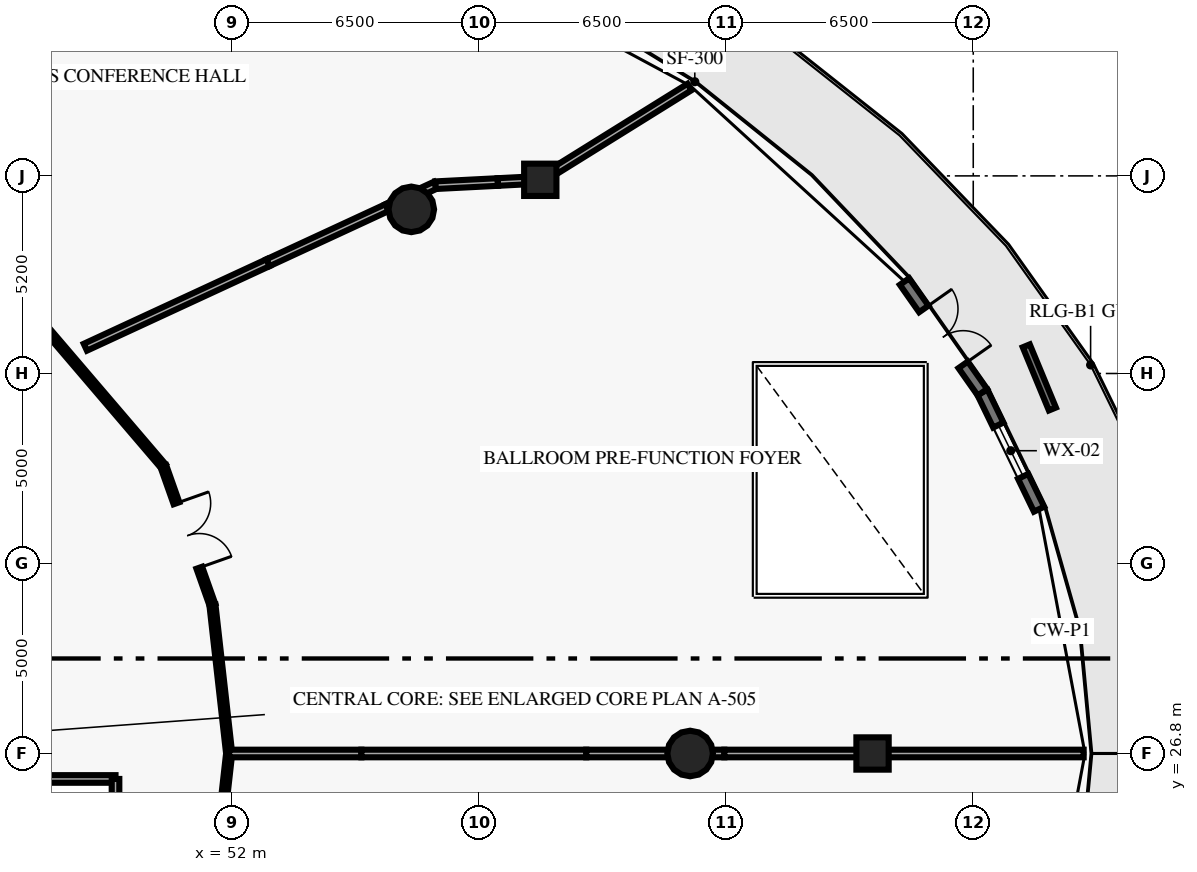
"""IFC4 building model, lengths in metres.
Left out: names, types, materials, properties, quantities, classifications, styles, units other than length and angle.
Written with IfcOpenShell. Run it as: python <this file> out.ifc"""

import sys

from ifc_helpers import new_model, si_unit, direction, frame, frame_2d, origin, origin_2d, place, context, subcontext, project, spatial, rectangle, circle, extrude, element, fill, save


model = new_model("IFC4")
c1 = context("Model", 3, precision=1e-05, world=origin(), true_north=direction((0.0, 1.0)))
c2 = subcontext(c1, "Body", "Model", "MODEL_VIEW")
j1 = project(units=[si_unit("LENGTHUNIT", "METRE"), si_unit("PLANEANGLEUNIT", "RADIAN")], contexts=[c1])
p1 = place(None, origin())
s1 = spatial("IfcSite", under=j1, at=p1, CompositionType="ELEMENT")
p2 = place(p1, origin())
s2 = spatial("IfcBuilding", under=s1, at=p2, CompositionType="ELEMENT")
p3 = place(p2, frame((0.0, 0.0, 11.0)))
s3 = spatial("IfcBuildingStorey", under=s2, at=p3, CompositionType="ELEMENT", Elevation=11.0)
for number, where, z_axis, x_axis in (
    (1, (64.05, 26.8, 0.0), (0.0, 0.0, 1.0), (1.0, 0.0, 0.0)),
    (2, (56.713, 41.119, 0.0), (0.0, 0.0, 1.0), (1.0, 0.0, 0.0)),
):
    element("IfcColumn", number, at=place(p3, frame(where, z_axis=z_axis, x_axis=x_axis)), inside=s3, PredefinedType="COLUMN", context=c2, shape_type="SweptSolid", body=[
        extrude(circle(Radius=0.6, at=origin_2d()), origin(), (0.0, 0.0, 1.0), 4.7),
    ])
for number, where, z_axis, x_axis in (
    (3, (68.85, 26.8, 0.0), (0.0, 0.0, 1.0), (1.0, 0.0, 0.0)),
    (4, (60.107, 41.897, 0.0), (0.0, 0.0, 1.0), (1.0, 0.0, 0.0)),
):
    element("IfcColumn", number, at=place(p3, frame(where, z_axis=z_axis, x_axis=x_axis)), inside=s3, PredefinedType="COLUMN", context=c2, shape_type="SweptSolid", body=[
        extrude(rectangle(XDim=0.85, YDim=0.85, at=origin_2d()), origin(), (0.0, 0.0, 1.0), 4.7),
    ])
p4 = place(p3, frame((71.742, 36.306, 0.0), z_axis=(0.0, 0.0, 1.0), x_axis=(0.435837168614, -0.900025534335, 0.0)))
e5 = element("IfcWall", 5, at=p4, inside=s3, PredefinedType="STANDARD", context=c2, shape_type="SweptSolid", body=[
    extrude(rectangle(XDim=3.419, YDim=0.3, at=frame_2d((1.709, 0.0))), origin(), (0.0, 0.0, 1.0), 4.7),
])
p5 = place(p4, frame((0.959, 0.0, 0.9)))
e6 = element("IfcOpeningElement", 6, at=p5, cuts=e5, PredefinedType="OPENING", context=c2, shape_type="SweptSolid", body=[
    extrude(rectangle(XDim=1.5, YDim=2.2, at=frame_2d((0.75, 1.1))), frame((0.0, 0.16, 0.0), z_axis=(0.0, -1.0, 0.0), x_axis=(1.0, 0.0, 0.0)), (0.0, 0.0, 1.0), 0.32),
])
p6 = place(p3, frame((69.692, 39.22, 0.0), z_axis=(0.0, 0.0, 1.0), x_axis=(0.575383073495, -0.817884049689, 0.0)))
e7 = element("IfcWall", 7, at=p6, inside=s3, PredefinedType="STANDARD", context=c2, shape_type="SweptSolid", body=[
    extrude(rectangle(XDim=3.563, YDim=0.3, at=frame_2d((1.781, 0.0))), origin(), (0.0, 0.0, 1.0), 4.7),
])
p7 = place(p6, frame((0.881, 0.0, 0.0)))
e8 = element("IfcOpeningElement", 8, at=p7, cuts=e7, PredefinedType="OPENING", context=c2, shape_type="SweptSolid", body=[
    extrude(rectangle(XDim=1.8, YDim=2.25, at=frame_2d((0.9, 1.125))), frame((0.0, 0.16, 0.0), z_axis=(0.0, -1.0, 0.0), x_axis=(1.0, 0.0, 0.0)), (0.0, 0.0, 1.0), 0.32),
])
p8 = place(p3, frame((72.895, 37.528, 0.0), z_axis=(0.0, 0.0, 1.0), x_axis=(0.382263927846, -0.924053185411, 0.0)))
e9 = element("IfcWall", 9, at=p8, inside=s3, PredefinedType="ELEMENTEDWALL", context=c2, shape_type="SweptSolid", body=[
    extrude(rectangle(XDim=1.8, YDim=0.2, at=frame_2d((0.9, 0.0))), origin(), (0.0, 0.0, 1.0), 0.65),
])
p9 = place(p3, frame((46.62, 26.13, 0.0), z_axis=(0.0, 0.0, 1.0), x_axis=(1.0, 0.0, 0.0)))
e10 = element("IfcWall", 10, at=p9, inside=s3, PredefinedType="SOLIDWALL", context=c2, shape_type="SweptSolid", body=[
    extrude(rectangle(XDim=2.31, YDim=0.2, at=frame_2d((1.155, 0.0))), origin(), (0.0, 0.0, 1.0), 4.7),
])
p10 = place(p3, frame((48.93, 23.72, 0.0), z_axis=(0.0, 0.0, 1.0), x_axis=(0.0, 1.0, 0.0)))
e11 = element("IfcWall", 11, at=p10, inside=s3, PredefinedType="SOLIDWALL", context=c2, shape_type="SweptSolid", body=[
    extrude(rectangle(XDim=2.41, YDim=0.2, at=frame_2d((1.205, 0.0))), origin(), (0.0, 0.0, 1.0), 4.7),
])
p11 = place(p3, frame((51.92, 26.8, 0.0), z_axis=(0.0, 0.0, 1.0), x_axis=(-0.111731247657, 0.993738460711, 0.0)))
e12 = element("IfcWall", 12, at=p11, inside=s3, PredefinedType="PARTITIONING", context=c2, shape_type="SweptSolid", body=[
    extrude(rectangle(XDim=3.938, YDim=0.16, at=frame_2d((1.969, 0.0))), origin(), (0.0, 0.0, 1.0), 4.7),
])
p12 = place(p3, frame((50.189, 34.36, 0.0), z_axis=(0.0, 0.0, 1.0), x_axis=(0.333684770033, -0.942684716248, 0.0)))
e13 = element("IfcWall", 13, at=p12, inside=s3, PredefinedType="PARTITIONING", context=c2, shape_type="SweptSolid", body=[
    extrude(rectangle(XDim=3.869, YDim=0.16, at=frame_2d((1.935, 0.0))), origin(), (0.0, 0.0, 1.0), 4.7),
])
p13 = place(p12, frame((1.034, 0.0, 0.0)))
e14 = element("IfcOpeningElement", 14, at=p13, cuts=e13, PredefinedType="OPENING", context=c2, shape_type="SweptSolid", body=[
    extrude(rectangle(XDim=1.8, YDim=2.3, at=frame_2d((0.9, 1.15))), frame((0.0, 0.09, 0.0), z_axis=(0.0, -1.0, 0.0), x_axis=(1.0, 0.0, 0.0)), (0.0, 0.0, 1.0), 0.18),
])
p14 = place(p3, frame((50.189, 34.36, 0.0), z_axis=(0.0, 0.0, 1.0), x_axis=(-0.649652680018, 0.760231145998, 0.0)))
e15 = element("IfcWall", 15, at=p14, inside=s3, PredefinedType="PARTITIONING", context=c2, shape_type="SweptSolid", body=[
    extrude(rectangle(XDim=7.279, YDim=0.16, at=frame_2d((3.64, 0.0))), origin(), (0.0, 0.0, 1.0), 4.7),
])
p15 = place(p3, frame((51.92, 26.8, 0.0), z_axis=(0.0, 0.0, 1.0), x_axis=(-0.111724363671, -0.99373923469, 0.0)))
e16 = element("IfcWall", 16, at=p15, inside=s3, PredefinedType="PARTITIONING", context=c2, shape_type="SweptSolid", body=[
    extrude(rectangle(XDim=3.938, YDim=0.16, at=frame_2d((1.969, 0.0))), origin(), (0.0, 0.0, 1.0), 4.7),
])
p16 = place(p15, frame((1.069, 0.0, 0.0)))
e17 = element("IfcOpeningElement", 17, at=p16, cuts=e16, PredefinedType="OPENING", context=c2, shape_type="SweptSolid", body=[
    extrude(rectangle(XDim=1.8, YDim=2.3, at=frame_2d((0.9, 1.15))), frame((0.0, 0.09, 0.0), z_axis=(0.0, -1.0, 0.0), x_axis=(1.0, 0.0, 0.0)), (0.0, 0.0, 1.0), 0.18),
])
p17 = place(p3, frame((51.92, 26.8, 0.0), z_axis=(0.0, 0.0, 1.0), x_axis=(1.0, 0.0, 0.0)))
e18 = element("IfcWall", 18, at=p17, inside=s3, PredefinedType="PARTITIONING", context=c2, shape_type="SweptSolid", body=[
    extrude(rectangle(XDim=3.48, YDim=0.2, at=frame_2d((1.74, 0.0))), origin(), (0.0, 0.0, 1.0), 4.7),
])
p18 = place(p3, frame((55.4, 26.8, 0.0), z_axis=(0.0, 0.0, 1.0), x_axis=(1.0, 0.0, 0.0)))
e19 = element("IfcWall", 19, at=p18, inside=s3, PredefinedType="PARTITIONING", context=c2, shape_type="SweptSolid", body=[
    extrude(rectangle(XDim=5.917, YDim=0.2, at=frame_2d((2.958, 0.0))), origin(), (0.0, 0.0, 1.0), 4.7),
])
p19 = place(p3, frame((61.317, 26.8, 0.0), z_axis=(0.0, 0.0, 1.0), x_axis=(1.0, 0.0, 0.0)))
e20 = element("IfcWall", 20, at=p19, inside=s3, PredefinedType="PARTITIONING", context=c2, shape_type="SweptSolid", body=[
    extrude(rectangle(XDim=3.633, YDim=0.2, at=frame_2d((1.816, 0.0))), origin(), (0.0, 0.0, 1.0), 3.66),
])
p20 = place(p3, frame((64.95, 26.8, 0.0), z_axis=(0.0, 0.0, 1.0), x_axis=(1.0, 0.0, 0.0)))
e21 = element("IfcWall", 21, at=p20, inside=s3, PredefinedType="PARTITIONING", context=c2, shape_type="SweptSolid", body=[
    extrude(rectangle(XDim=3.9, YDim=0.2, at=frame_2d((1.95, 0.0))), origin(), (0.0, 0.0, 1.0), 4.24),
])
p21 = place(p3, frame((68.85, 26.8, 0.0), z_axis=(0.0, 0.0, 1.0), x_axis=(1.0, 0.0, 0.0)))
e22 = element("IfcWall", 22, at=p21, inside=s3, PredefinedType="PARTITIONING", context=c2, shape_type="SweptSolid", body=[
    extrude(rectangle(XDim=5.555, YDim=0.2, at=frame_2d((2.777, 0.0))), origin(), (0.0, 0.0, 1.0), 4.7),
])
p22 = place(p3, frame((48.136, 37.491, 0.0), z_axis=(0.0, 0.0, 1.0), x_axis=(0.907524785669, 0.419998527851, 0.0)))
e23 = element("IfcWall", 23, at=p22, inside=s3, PredefinedType="PARTITIONING", context=c2, shape_type="SweptSolid", body=[
    extrude(rectangle(XDim=5.3, YDim=0.2, at=frame_2d((2.65, 0.0))), origin(), (0.0, 0.0, 1.0), 4.7),
])
p23 = place(p3, frame((52.946, 39.717, 0.0), z_axis=(0.0, 0.0, 1.0), x_axis=(0.90747190463, 0.420112773321, 0.0)))
e24 = element("IfcWall", 24, at=p23, inside=s3, PredefinedType="PARTITIONING", context=c2, shape_type="SweptSolid", body=[
    extrude(rectangle(XDim=3.449, YDim=0.2, at=frame_2d((1.725, 0.0))), origin(), (0.0, 0.0, 1.0), 3.92),
])
p24 = place(p3, frame((56.076, 41.166, 0.0), z_axis=(0.0, 0.0, 1.0), x_axis=(0.907622896373, 0.419786467124, 0.0)))
e25 = element("IfcWall", 25, at=p24, inside=s3, PredefinedType="PARTITIONING", context=c2, shape_type="SweptSolid", body=[
    extrude(rectangle(XDim=1.403, YDim=0.2, at=frame_2d((0.701, 0.0))), origin(), (0.0, 0.0, 1.0), 4.7),
])
p25 = place(p3, frame((57.349, 41.755, 0.0), z_axis=(0.0, 0.0, 1.0), x_axis=(0.998685128887, 0.051264152576, 0.0)))
e26 = element("IfcWall", 26, at=p25, inside=s3, PredefinedType="PARTITIONING", context=c2, shape_type="SweptSolid", body=[
    extrude(rectangle(XDim=1.643, YDim=0.2, at=frame_2d((0.822, 0.0))), origin(), (0.0, 0.0, 1.0), 4.7),
])
p26 = place(p3, frame((58.99, 41.839, 0.0), z_axis=(0.0, 0.0, 1.0), x_axis=(0.998660904733, 0.051733909163, 0.0)))
e27 = element("IfcWall", 27, at=p26, inside=s3, PredefinedType="PARTITIONING", context=c2, shape_type="SweptSolid", body=[
    extrude(rectangle(XDim=1.118, YDim=0.2, at=frame_2d((0.559, 0.0))), origin(), (0.0, 0.0, 1.0), 4.24),
])
p27 = place(p3, frame((60.107, 41.897, 0.0), z_axis=(0.0, 0.0, 1.0), x_axis=(0.849149708827, 0.528152224267, 0.0)))
e28 = element("IfcWall", 28, at=p27, inside=s3, PredefinedType="PARTITIONING", context=c2, shape_type="SweptSolid", body=[
    extrude(rectangle(XDim=4.626, YDim=0.2, at=frame_2d((2.313, 0.0))), origin(), (0.0, 0.0, 1.0), 4.7),
])
p28 = place(p5, origin())
e29 = element("IfcWindow", 29, at=p28, inside=s3, PartitioningType="DOUBLE_PANEL_VERTICAL", PredefinedType="WINDOW", context=c2, shape_type="SweptSolid", body=[
    extrude(rectangle(XDim=1.5, YDim=2.2, at=frame_2d((0.75, 1.1))), frame((0.0, 0.03, 0.0), z_axis=(0.0, -1.0, 0.0), x_axis=(1.0, 0.0, 0.0)), (0.0, 0.0, 1.0), 0.06),
])
fill(e6, e29)
p29 = place(p7, origin())
e30 = element("IfcDoor", 30, at=p29, inside=s3, OperationType="DOUBLE_DOOR_SINGLE_SWING", PredefinedType="DOOR", context=c2, shape_type="SweptSolid", body=[
    extrude(rectangle(XDim=1.8, YDim=2.25, at=frame_2d((0.9, 1.125))), frame((0.0, 0.025, 0.0), z_axis=(0.0, -1.0, 0.0), x_axis=(1.0, 0.0, 0.0)), (0.0, 0.0, 1.0), 0.05),
])
fill(e8, e30)
p30 = place(p13, origin())
e31 = element("IfcDoor", 31, at=p30, inside=s3, OperationType="DOUBLE_DOOR_SINGLE_SWING", PredefinedType="DOOR", context=c2, shape_type="SweptSolid", body=[
    extrude(rectangle(XDim=1.8, YDim=2.3, at=frame_2d((0.9, 1.15))), frame((0.0, 0.025, 0.0), z_axis=(0.0, -1.0, 0.0), x_axis=(1.0, 0.0, 0.0)), (0.0, 0.0, 1.0), 0.05),
])
fill(e14, e31)
save(model, sys.argv[1])
